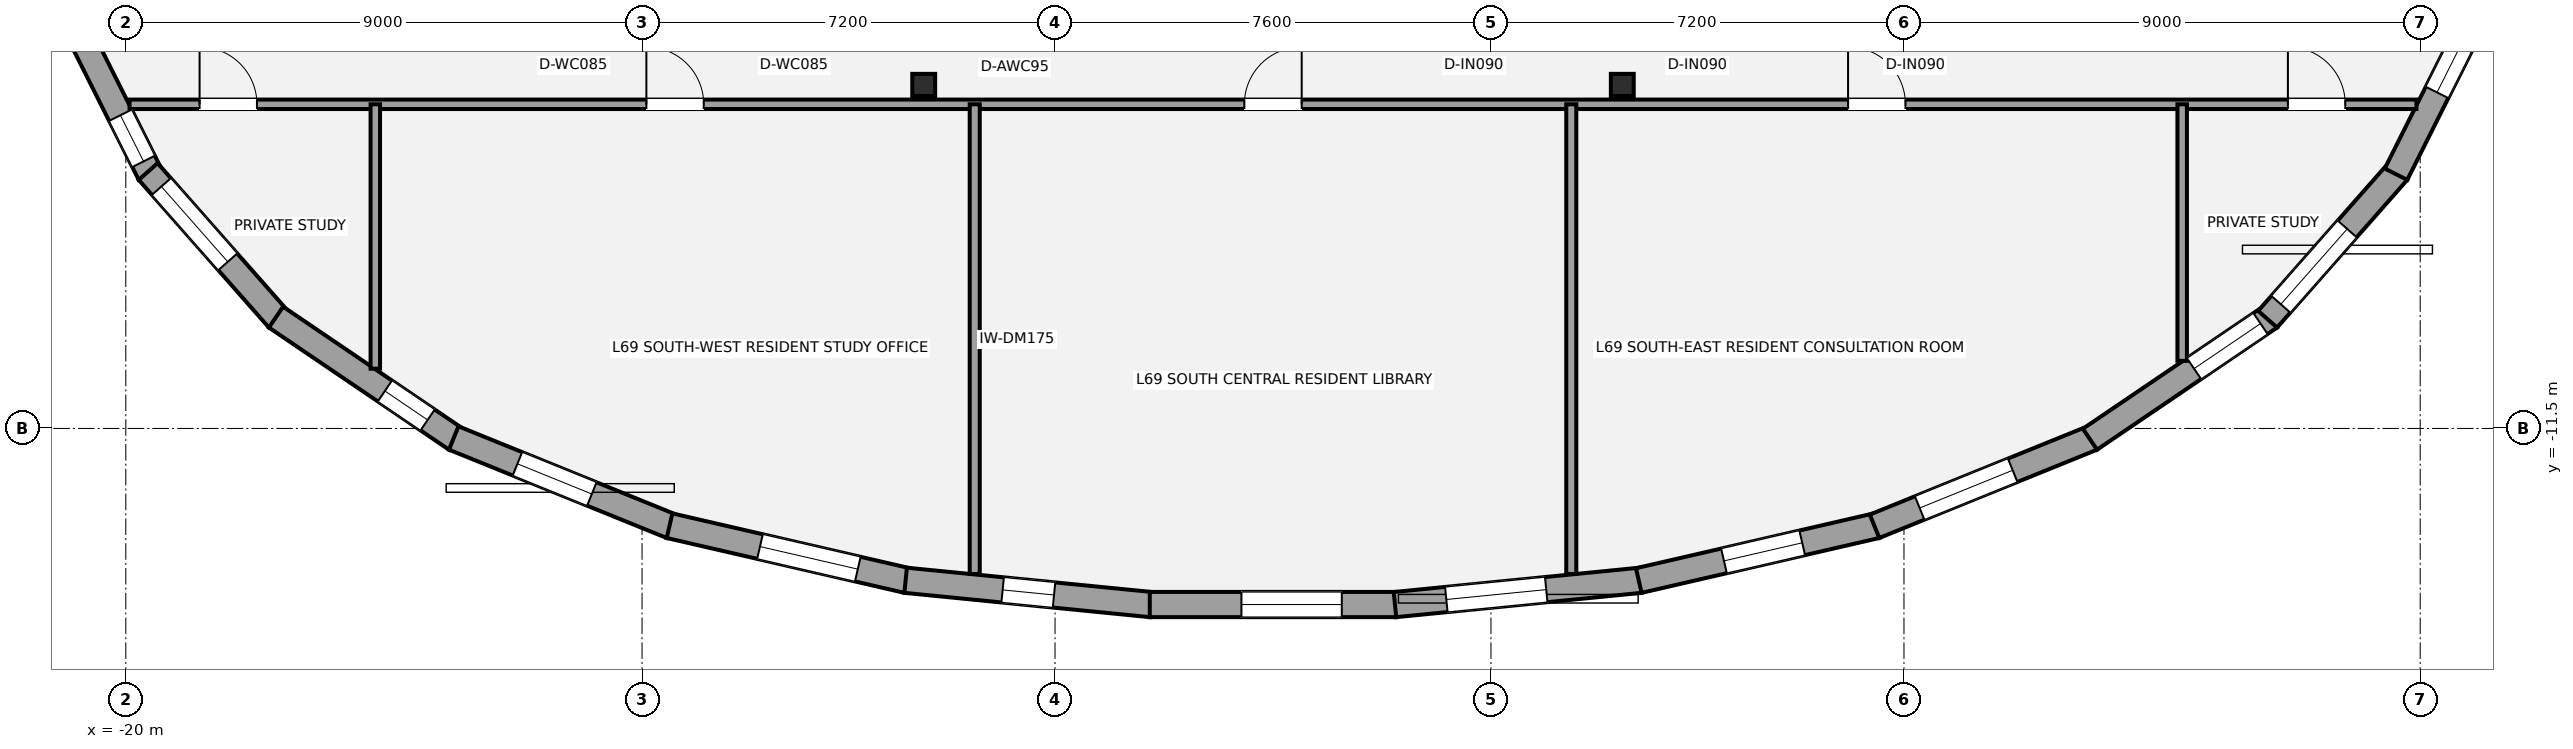
"""IFC4 building model, lengths in metres.
Left out: names, types, materials, properties, quantities, classifications, styles, units other than length and angle.
Written with IfcOpenShell. Run it as: python <this file> out.ifc"""

import sys

from ifc_helpers import new_model, si_unit, direction, frame, frame_2d, origin, origin_2d, place, context, subcontext, project, spatial, rectangle, i_section, extrude, element, fill, save


model = new_model("IFC4")
c1 = context("Model", 3, precision=1e-05, world=origin(), true_north=direction((0.0, 1.0)))
c2 = subcontext(c1, "Body", "Model", "MODEL_VIEW")
j1 = project(units=[si_unit("LENGTHUNIT", "METRE"), si_unit("PLANEANGLEUNIT", "RADIAN")], contexts=[c1])
p1 = place(None, origin())
s1 = spatial("IfcSite", under=j1, at=p1, CompositionType="ELEMENT")
p2 = place(p1, origin())
s2 = spatial("IfcBuilding", under=s1, at=p2, CompositionType="ELEMENT")
p3 = place(p2, frame((0.0, 0.0, 244.65)))
s3 = spatial("IfcBuildingStorey", under=s2, at=p3, CompositionType="ELEMENT", Elevation=244.65)
for number, where, z_axis, x_axis in (
    (1, (-6.09, -5.513, 0.0), (0.0, 0.0, 1.0), (1.0, 0.0, 0.0)),
    (2, (6.09, -5.513, 0.0), (0.0, 0.0, 1.0), (1.0, 0.0, 0.0)),
):
    element("IfcColumn", number, at=place(p3, frame(where, z_axis=z_axis, x_axis=x_axis)), inside=s3, PredefinedType="COLUMN", context=c2, shape_type="SweptSolid", body=[
        extrude(i_section(OverallWidth=0.399, OverallDepth=0.387, WebThickness=0.021, FlangeThickness=0.033, at=origin_2d()), origin(), (0.0, 0.0, 1.0), 3.15),
    ])
p4 = place(p3, frame((-19.578, -7.069, 0.0), z_axis=(0.0, 0.0, 1.0), x_axis=(-0.448424724145, 0.893820601002, 0.0)))
e3 = element("IfcWall", 3, at=p4, inside=s3, PredefinedType="STANDARD", context=c2, shape_type="SweptSolid", body=[
    extrude(rectangle(XDim=3.144, YDim=0.44, at=frame_2d((1.572, 0.0))), origin(), (0.0, 0.0, 1.0), 2.336),
])
p5 = place(p4, frame((0.25, 0.0, 0.58)))
e4 = element("IfcOpeningElement", 4, at=p5, cuts=e3, PredefinedType="OPENING", context=c2, shape_type="SweptSolid", body=[
    extrude(rectangle(XDim=0.9, YDim=1.35, at=frame_2d((0.45, 0.675))), frame((0.0, 0.23, 0.0), z_axis=(0.0, -1.0, 0.0), x_axis=(1.0, 0.0, 0.0)), (0.0, 0.0, 1.0), 0.46),
])
p6 = place(p3, frame((-17.34, -9.596, 0.0), z_axis=(0.0, 0.0, 1.0), x_axis=(-0.66136043846, 0.750068243855, 0.0)))
e5 = element("IfcWall", 5, at=p6, inside=s3, PredefinedType="STANDARD", context=c2, shape_type="SweptSolid", body=[
    extrude(rectangle(XDim=3.432, YDim=0.44, at=frame_2d((1.716, 0.0))), origin(), (0.0, 0.0, 1.0), 2.336),
])
p7 = place(p6, frame((1.334, 0.0, 0.55)))
e6 = element("IfcOpeningElement", 6, at=p7, cuts=e5, PredefinedType="OPENING", context=c2, shape_type="SweptSolid", body=[
    extrude(rectangle(XDim=1.75, YDim=1.55, at=frame_2d((0.875, 0.775))), frame((0.0, 0.23, 0.0), z_axis=(0.0, -1.0, 0.0), x_axis=(1.0, 0.0, 0.0)), (0.0, 0.0, 1.0), 0.46),
])
p8 = place(p3, frame((-14.242, -11.688, 0.0), z_axis=(0.0, 0.0, 1.0), x_axis=(-0.827637036896, 0.561263694851, 0.0)))
e7 = element("IfcWall", 7, at=p8, inside=s3, PredefinedType="STANDARD", context=c2, shape_type="SweptSolid", body=[
    extrude(rectangle(XDim=3.793, YDim=0.44, at=frame_2d((1.896, 0.0))), origin(), (0.0, 0.0, 1.0), 2.336),
])
p9 = place(p8, frame((0.599, 0.0, 0.58)))
e8 = element("IfcOpeningElement", 8, at=p9, cuts=e7, PredefinedType="OPENING", context=c2, shape_type="SweptSolid", body=[
    extrude(rectangle(XDim=0.9, YDim=1.35, at=frame_2d((0.45, 0.675))), frame((0.0, 0.23, 0.0), z_axis=(0.0, -1.0, 0.0), x_axis=(1.0, 0.0, 0.0)), (0.0, 0.0, 1.0), 0.46),
])
p10 = place(p3, frame((-10.487, -13.205, 0.0), z_axis=(0.0, 0.0, 1.0), x_axis=(-0.926731976866, 0.375723093586, 0.0)))
e9 = element("IfcWall", 9, at=p10, inside=s3, PredefinedType="STANDARD", context=c2, shape_type="SweptSolid", body=[
    extrude(rectangle(XDim=4.096, YDim=0.44, at=frame_2d((2.048, 0.0))), origin(), (0.0, 0.0, 1.0), 2.336),
])
p11 = place(p10, frame((1.498, 0.0, 0.55)))
e10 = element("IfcOpeningElement", 10, at=p11, cuts=e9, PredefinedType="OPENING", context=c2, shape_type="SweptSolid", body=[
    extrude(rectangle(XDim=1.4, YDim=1.55, at=frame_2d((0.7, 0.775))), frame((0.0, 0.23, 0.0), z_axis=(0.0, -1.0, 0.0), x_axis=(1.0, 0.0, 0.0)), (0.0, 0.0, 1.0), 0.46),
])
p12 = place(p3, frame((-6.377, -14.151, 0.0), z_axis=(0.0, 0.0, 1.0), x_axis=(-0.974398936081, 0.224825962391, 0.0)))
e11 = element("IfcWall", 11, at=p12, inside=s3, PredefinedType="STANDARD", context=c2, shape_type="SweptSolid", body=[
    extrude(rectangle(XDim=4.252, YDim=0.44, at=frame_2d((2.126, 0.0))), origin(), (0.0, 0.0, 1.0), 2.336),
])
p13 = place(p12, frame((0.885, 0.0, 0.55)))
e12 = element("IfcOpeningElement", 12, at=p13, cuts=e11, PredefinedType="OPENING", context=c2, shape_type="SweptSolid", body=[
    extrude(rectangle(XDim=1.75, YDim=1.55, at=frame_2d((0.875, 0.775))), frame((0.0, 0.23, 0.0), z_axis=(0.0, -1.0, 0.0), x_axis=(1.0, 0.0, 0.0)), (0.0, 0.0, 1.0), 0.46),
])
p14 = place(p3, frame((-2.126, -14.57, 0.0), z_axis=(0.0, 0.0, 1.0), x_axis=(-0.995134540264, 0.098525361068, 0.0)))
e13 = element("IfcWall", 13, at=p14, inside=s3, PredefinedType="STANDARD", context=c2, shape_type="SweptSolid", body=[
    extrude(rectangle(XDim=4.299, YDim=0.44, at=frame_2d((2.15, 0.0))), origin(), (0.0, 0.0, 1.0), 2.336),
])
p15 = place(p14, frame((1.7, 0.0, 0.58)))
e14 = element("IfcOpeningElement", 14, at=p15, cuts=e13, PredefinedType="OPENING", context=c2, shape_type="SweptSolid", body=[
    extrude(rectangle(XDim=0.9, YDim=1.35, at=frame_2d((0.45, 0.675))), frame((0.0, 0.23, 0.0), z_axis=(0.0, -1.0, 0.0), x_axis=(1.0, 0.0, 0.0)), (0.0, 0.0, 1.0), 0.46),
])
p16 = place(p3, frame((2.148, -14.569, 0.0), z_axis=(0.0, 0.0, 1.0), x_axis=(-1.0, 0.0, 0.0)))
e15 = element("IfcWall", 15, at=p16, inside=s3, PredefinedType="STANDARD", context=c2, shape_type="SweptSolid", body=[
    extrude(rectangle(XDim=4.296, YDim=0.44, at=frame_2d((2.148, 0.0))), origin(), (0.0, 0.0, 1.0), 2.336),
])
p17 = place(p16, frame((0.948, 0.0, 0.55)))
e16 = element("IfcOpeningElement", 16, at=p17, cuts=e15, PredefinedType="OPENING", context=c2, shape_type="SweptSolid", body=[
    extrude(rectangle(XDim=1.75, YDim=1.55, at=frame_2d((0.875, 0.775))), frame((0.0, 0.23, 0.0), z_axis=(0.0, -1.0, 0.0), x_axis=(1.0, 0.0, 0.0)), (0.0, 0.0, 1.0), 0.46),
])
p18 = place(p3, frame((6.405, -14.146, 0.0), z_axis=(0.0, 0.0, 1.0), x_axis=(-0.995134540264, -0.098525361068, 0.0)))
e17 = element("IfcWall", 17, at=p18, inside=s3, PredefinedType="STANDARD", context=c2, shape_type="SweptSolid", body=[
    extrude(rectangle(XDim=4.299, YDim=0.44, at=frame_2d((2.15, 0.0))), origin(), (0.0, 0.0, 1.0), 2.336),
])
p19 = place(p18, frame((1.649, 0.0, 0.55)))
e18 = element("IfcOpeningElement", 18, at=p19, cuts=e17, PredefinedType="OPENING", context=c2, shape_type="SweptSolid", body=[
    extrude(rectangle(XDim=1.75, YDim=1.55, at=frame_2d((0.875, 0.775))), frame((0.0, 0.23, 0.0), z_axis=(0.0, -1.0, 0.0), x_axis=(1.0, 0.0, 0.0)), (0.0, 0.0, 1.0), 0.46),
])
p20 = place(p3, frame((10.52, -13.195, 0.0), z_axis=(0.0, 0.0, 1.0), x_axis=(-0.974398936081, -0.224825962391, 0.0)))
e19 = element("IfcWall", 19, at=p20, inside=s3, PredefinedType="STANDARD", context=c2, shape_type="SweptSolid", body=[
    extrude(rectangle(XDim=4.252, YDim=0.44, at=frame_2d((2.126, 0.0))), origin(), (0.0, 0.0, 1.0), 2.336),
])
p21 = place(p20, frame((1.328, 0.0, 0.55)))
e20 = element("IfcOpeningElement", 20, at=p21, cuts=e19, PredefinedType="OPENING", context=c2, shape_type="SweptSolid", body=[
    extrude(rectangle(XDim=1.4, YDim=1.55, at=frame_2d((0.7, 0.775))), frame((0.0, 0.23, 0.0), z_axis=(0.0, -1.0, 0.0), x_axis=(1.0, 0.0, 0.0)), (0.0, 0.0, 1.0), 0.46),
])
p22 = place(p3, frame((14.283, -11.666, 0.0), z_axis=(0.0, 0.0, 1.0), x_axis=(-0.926731976866, -0.375723093586, 0.0)))
e21 = element("IfcWall", 21, at=p22, inside=s3, PredefinedType="STANDARD", context=c2, shape_type="SweptSolid", body=[
    extrude(rectangle(XDim=4.096, YDim=0.44, at=frame_2d((2.048, 0.0))), origin(), (0.0, 0.0, 1.0), 2.336),
])
p23 = place(p22, frame((1.498, 0.0, 0.55)))
e22 = element("IfcOpeningElement", 22, at=p23, cuts=e21, PredefinedType="OPENING", context=c2, shape_type="SweptSolid", body=[
    extrude(rectangle(XDim=1.75, YDim=1.55, at=frame_2d((0.875, 0.775))), frame((0.0, 0.23, 0.0), z_axis=(0.0, -1.0, 0.0), x_axis=(1.0, 0.0, 0.0)), (0.0, 0.0, 1.0), 0.46),
])
p24 = place(p3, frame((17.381, -9.559, 0.0), z_axis=(0.0, 0.0, 1.0), x_axis=(-0.827637036896, -0.561263694851, 0.0)))
e23 = element("IfcWall", 23, at=p24, inside=s3, PredefinedType="STANDARD", context=c2, shape_type="SweptSolid", body=[
    extrude(rectangle(XDim=3.793, YDim=0.44, at=frame_2d((1.896, 0.0))), origin(), (0.0, 0.0, 1.0), 2.336),
])
p25 = place(p24, frame((0.2, 0.0, 0.58)))
e24 = element("IfcOpeningElement", 24, at=p25, cuts=e23, PredefinedType="OPENING", context=c2, shape_type="SweptSolid", body=[
    extrude(rectangle(XDim=1.4, YDim=1.55, at=frame_2d((0.7, 0.775))), frame((0.0, 0.23, 0.0), z_axis=(0.0, -1.0, 0.0), x_axis=(1.0, 0.0, 0.0)), (0.0, 0.0, 1.0), 0.46),
])
p26 = place(p3, frame((19.61, -7.022, 0.0), z_axis=(0.0, 0.0, 1.0), x_axis=(-0.66136043846, -0.750068243855, 0.0)))
e25 = element("IfcWall", 25, at=p26, inside=s3, PredefinedType="STANDARD", context=c2, shape_type="SweptSolid", body=[
    extrude(rectangle(XDim=3.432, YDim=0.44, at=frame_2d((1.716, 0.0))), origin(), (0.0, 0.0, 1.0), 2.336),
])
p27 = place(p26, frame((1.334, 0.0, 0.55)))
e26 = element("IfcOpeningElement", 26, at=p27, cuts=e25, PredefinedType="OPENING", context=c2, shape_type="SweptSolid", body=[
    extrude(rectangle(XDim=1.75, YDim=1.55, at=frame_2d((0.875, 0.775))), frame((0.0, 0.23, 0.0), z_axis=(0.0, -1.0, 0.0), x_axis=(1.0, 0.0, 0.0)), (0.0, 0.0, 1.0), 0.46),
])
p28 = place(p3, frame((20.988, -4.259, 0.0), z_axis=(0.0, 0.0, 1.0), x_axis=(-0.448424724145, -0.893820601002, 0.0)))
e27 = element("IfcWall", 27, at=p28, inside=s3, PredefinedType="STANDARD", context=c2, shape_type="SweptSolid", body=[
    extrude(rectangle(XDim=3.144, YDim=0.44, at=frame_2d((1.572, 0.0))), origin(), (0.0, 0.0, 1.0), 2.336),
])
p29 = place(p28, frame((0.648, 0.0, 0.58)))
e28 = element("IfcOpeningElement", 28, at=p29, cuts=e27, PredefinedType="OPENING", context=c2, shape_type="SweptSolid", body=[
    extrude(rectangle(XDim=0.9, YDim=1.35, at=frame_2d((0.45, 0.675))), frame((0.0, 0.23, 0.0), z_axis=(0.0, -1.0, 0.0), x_axis=(1.0, 0.0, 0.0)), (0.0, 0.0, 1.0), 0.46),
])
p30 = place(p3, frame((-19.935, -5.85, 0.0), z_axis=(0.0, 0.0, 1.0), x_axis=(1.0, 0.0, 0.0)))
e29 = element("IfcWall", 29, at=p30, inside=s3, PredefinedType="PARTITIONING", context=c2, shape_type="SweptSolid", body=[
    extrude(rectangle(XDim=39.869, YDim=0.165, at=frame_2d((19.935, 0.0))), origin(), (0.0, 0.0, 1.0), 2.423),
])
p31 = place(p30, frame((1.221, 0.0, 0.0)))
e30 = element("IfcOpeningElement", 30, at=p31, cuts=e29, PredefinedType="OPENING", context=c2, shape_type="SweptSolid", body=[
    extrude(rectangle(XDim=1.0, YDim=2.15, at=frame_2d((0.5, 1.075))), frame((0.0, 0.093, 0.0), z_axis=(0.0, -1.0, 0.0), x_axis=(1.0, 0.0, 0.0)), (0.0, 0.0, 1.0), 0.185),
])
p32 = place(p30, frame((37.628, 0.0, 0.0)))
e31 = element("IfcOpeningElement", 31, at=p32, cuts=e29, PredefinedType="OPENING", context=c2, shape_type="SweptSolid", body=[
    extrude(rectangle(XDim=1.0, YDim=2.15, at=frame_2d((0.5, 1.075))), frame((0.0, 0.093, 0.0), z_axis=(0.0, -1.0, 0.0), x_axis=(1.0, 0.0, 0.0)), (0.0, 0.0, 1.0), 0.185),
])
p33 = place(p30, frame((9.01, 0.0, 0.0)))
e32 = element("IfcOpeningElement", 32, at=p33, cuts=e29, PredefinedType="OPENING", context=c2, shape_type="SweptSolid", body=[
    extrude(rectangle(XDim=1.0, YDim=2.15, at=frame_2d((0.5, 1.075))), frame((0.0, 0.093, 0.0), z_axis=(0.0, -1.0, 0.0), x_axis=(1.0, 0.0, 0.0)), (0.0, 0.0, 1.0), 0.185),
])
p34 = place(p30, frame((19.435, 0.0, 0.0)))
e33 = element("IfcOpeningElement", 33, at=p34, cuts=e29, PredefinedType="OPENING", context=c2, shape_type="SweptSolid", body=[
    extrude(rectangle(XDim=1.0, YDim=2.15, at=frame_2d((0.5, 1.075))), frame((0.0, 0.093, 0.0), z_axis=(0.0, -1.0, 0.0), x_axis=(1.0, 0.0, 0.0)), (0.0, 0.0, 1.0), 0.185),
])
p35 = place(p30, frame((29.96, 0.0, 0.0)))
e34 = element("IfcOpeningElement", 34, at=p35, cuts=e29, PredefinedType="OPENING", context=c2, shape_type="SweptSolid", body=[
    extrude(rectangle(XDim=1.0, YDim=2.15, at=frame_2d((0.5, 1.075))), frame((0.0, 0.093, 0.0), z_axis=(0.0, -1.0, 0.0), x_axis=(1.0, 0.0, 0.0)), (0.0, 0.0, 1.0), 0.185),
])
p36 = place(p3, frame((-15.65, -10.458, 0.0), z_axis=(0.0, 0.0, 1.0), x_axis=(0.0, 1.0, 0.0)))
e35 = element("IfcWall", 35, at=p36, inside=s3, PredefinedType="PARTITIONING", context=c2, shape_type="SweptSolid", body=[
    extrude(rectangle(XDim=4.608, YDim=0.165, at=frame_2d((2.304, 0.0))), origin(), (0.0, 0.0, 1.0), 2.423),
])
p37 = place(p3, frame((15.85, -10.322, 0.0), z_axis=(0.0, 0.0, 1.0), x_axis=(0.0, 1.0, 0.0)))
e36 = element("IfcWall", 36, at=p37, inside=s3, PredefinedType="PARTITIONING", context=c2, shape_type="SweptSolid", body=[
    extrude(rectangle(XDim=4.472, YDim=0.165, at=frame_2d((2.236, 0.0))), origin(), (0.0, 0.0, 1.0), 2.423),
])
for number, where, z_axis, x_axis in (
    (37, (-5.2, -14.036, 0.0), (0.0, 0.0, 1.0), (0.0, 1.0, 0.0)),
    (38, (5.2, -14.036, 0.0), (0.0, 0.0, 1.0), (0.0, 1.0, 0.0)),
):
    element("IfcWall", number, at=place(p3, frame(where, z_axis=z_axis, x_axis=x_axis)), inside=s3, PredefinedType="PARTITIONING", context=c2, shape_type="SweptSolid", body=[
        extrude(rectangle(XDim=8.186, YDim=0.175, at=frame_2d((4.093, 0.0))), origin(), (0.0, 0.0, 1.0), 2.423),
    ])
p38 = place(p5, origin())
e39 = element("IfcWindow", 39, at=p38, inside=s3, PartitioningType="SINGLE_PANEL", PredefinedType="WINDOW", context=c2, shape_type="SweptSolid", body=[
    extrude(rectangle(XDim=0.9, YDim=1.35, at=frame_2d((0.45, 0.675))), frame((0.0, -0.01, 0.0), z_axis=(0.0, -1.0, 0.0), x_axis=(1.0, 0.0, 0.0)), (0.0, 0.0, 1.0), 0.06),
])
fill(e4, e39)
p39 = place(p7, origin())
e40 = element("IfcWindow", 40, at=p39, inside=s3, PartitioningType="SINGLE_PANEL", PredefinedType="WINDOW", context=c2, shape_type="SweptSolid", body=[
    extrude(rectangle(XDim=1.75, YDim=1.55, at=frame_2d((0.875, 0.775))), frame((0.0, -0.01, 0.0), z_axis=(0.0, -1.0, 0.0), x_axis=(1.0, 0.0, 0.0)), (0.0, 0.0, 1.0), 0.06),
])
fill(e6, e40)
p40 = place(p9, origin())
e41 = element("IfcWindow", 41, at=p40, inside=s3, PartitioningType="SINGLE_PANEL", PredefinedType="WINDOW", context=c2, shape_type="SweptSolid", body=[
    extrude(rectangle(XDim=0.9, YDim=1.35, at=frame_2d((0.45, 0.675))), frame((0.0, -0.01, 0.0), z_axis=(0.0, -1.0, 0.0), x_axis=(1.0, 0.0, 0.0)), (0.0, 0.0, 1.0), 0.06),
])
fill(e8, e41)
p41 = place(p11, origin())
e42 = element("IfcWindow", 42, at=p41, inside=s3, PartitioningType="SINGLE_PANEL", PredefinedType="WINDOW", context=c2, shape_type="SweptSolid", body=[
    extrude(rectangle(XDim=1.4, YDim=1.55, at=frame_2d((0.7, 0.775))), frame((0.0, -0.01, 0.0), z_axis=(0.0, -1.0, 0.0), x_axis=(1.0, 0.0, 0.0)), (0.0, 0.0, 1.0), 0.06),
])
fill(e10, e42)
p42 = place(p13, origin())
e43 = element("IfcWindow", 43, at=p42, inside=s3, PartitioningType="SINGLE_PANEL", PredefinedType="WINDOW", context=c2, shape_type="SweptSolid", body=[
    extrude(rectangle(XDim=1.75, YDim=1.55, at=frame_2d((0.875, 0.775))), frame((0.0, -0.01, 0.0), z_axis=(0.0, -1.0, 0.0), x_axis=(1.0, 0.0, 0.0)), (0.0, 0.0, 1.0), 0.06),
])
fill(e12, e43)
p43 = place(p15, origin())
e44 = element("IfcWindow", 44, at=p43, inside=s3, PartitioningType="SINGLE_PANEL", PredefinedType="WINDOW", context=c2, shape_type="SweptSolid", body=[
    extrude(rectangle(XDim=0.9, YDim=1.35, at=frame_2d((0.45, 0.675))), frame((0.0, -0.01, 0.0), z_axis=(0.0, -1.0, 0.0), x_axis=(1.0, 0.0, 0.0)), (0.0, 0.0, 1.0), 0.06),
])
fill(e14, e44)
p44 = place(p17, origin())
e45 = element("IfcWindow", 45, at=p44, inside=s3, PartitioningType="SINGLE_PANEL", PredefinedType="WINDOW", context=c2, shape_type="SweptSolid", body=[
    extrude(rectangle(XDim=1.75, YDim=1.55, at=frame_2d((0.875, 0.775))), frame((0.0, -0.01, 0.0), z_axis=(0.0, -1.0, 0.0), x_axis=(1.0, 0.0, 0.0)), (0.0, 0.0, 1.0), 0.06),
])
fill(e16, e45)
p45 = place(p19, origin())
e46 = element("IfcWindow", 46, at=p45, inside=s3, PartitioningType="SINGLE_PANEL", PredefinedType="WINDOW", context=c2, shape_type="SweptSolid", body=[
    extrude(rectangle(XDim=1.75, YDim=1.55, at=frame_2d((0.875, 0.775))), frame((0.0, -0.01, 0.0), z_axis=(0.0, -1.0, 0.0), x_axis=(1.0, 0.0, 0.0)), (0.0, 0.0, 1.0), 0.06),
])
fill(e18, e46)
p46 = place(p21, origin())
e47 = element("IfcWindow", 47, at=p46, inside=s3, PartitioningType="SINGLE_PANEL", PredefinedType="WINDOW", context=c2, shape_type="SweptSolid", body=[
    extrude(rectangle(XDim=1.4, YDim=1.55, at=frame_2d((0.7, 0.775))), frame((0.0, -0.01, 0.0), z_axis=(0.0, -1.0, 0.0), x_axis=(1.0, 0.0, 0.0)), (0.0, 0.0, 1.0), 0.06),
])
fill(e20, e47)
p47 = place(p23, origin())
e48 = element("IfcWindow", 48, at=p47, inside=s3, PartitioningType="SINGLE_PANEL", PredefinedType="WINDOW", context=c2, shape_type="SweptSolid", body=[
    extrude(rectangle(XDim=1.75, YDim=1.55, at=frame_2d((0.875, 0.775))), frame((0.0, -0.01, 0.0), z_axis=(0.0, -1.0, 0.0), x_axis=(1.0, 0.0, 0.0)), (0.0, 0.0, 1.0), 0.06),
])
fill(e22, e48)
p48 = place(p25, origin())
e49 = element("IfcWindow", 49, at=p48, inside=s3, PartitioningType="SINGLE_PANEL", PredefinedType="WINDOW", context=c2, shape_type="SweptSolid", body=[
    extrude(rectangle(XDim=1.4, YDim=1.55, at=frame_2d((0.7, 0.775))), frame((0.0, -0.01, 0.0), z_axis=(0.0, -1.0, 0.0), x_axis=(1.0, 0.0, 0.0)), (0.0, 0.0, 1.0), 0.06),
])
fill(e24, e49)
p49 = place(p27, origin())
e50 = element("IfcWindow", 50, at=p49, inside=s3, PartitioningType="SINGLE_PANEL", PredefinedType="WINDOW", context=c2, shape_type="SweptSolid", body=[
    extrude(rectangle(XDim=1.75, YDim=1.55, at=frame_2d((0.875, 0.775))), frame((0.0, -0.01, 0.0), z_axis=(0.0, -1.0, 0.0), x_axis=(1.0, 0.0, 0.0)), (0.0, 0.0, 1.0), 0.06),
])
fill(e26, e50)
p50 = place(p29, origin())
e51 = element("IfcWindow", 51, at=p50, inside=s3, PartitioningType="SINGLE_PANEL", PredefinedType="WINDOW", context=c2, shape_type="SweptSolid", body=[
    extrude(rectangle(XDim=0.9, YDim=1.35, at=frame_2d((0.45, 0.675))), frame((0.0, -0.01, 0.0), z_axis=(0.0, -1.0, 0.0), x_axis=(1.0, 0.0, 0.0)), (0.0, 0.0, 1.0), 0.06),
])
fill(e28, e51)
p51 = place(p31, origin())
e52 = element("IfcDoor", 52, at=p51, inside=s3, OperationType="SINGLE_SWING_LEFT", PredefinedType="DOOR", context=c2, shape_type="SweptSolid", body=[
    extrude(rectangle(XDim=1.0, YDim=2.15, at=frame_2d((0.5, 1.075))), frame((0.0, 0.025, 0.0), z_axis=(0.0, -1.0, 0.0), x_axis=(1.0, 0.0, 0.0)), (0.0, 0.0, 1.0), 0.05),
])
fill(e30, e52)
p52 = place(p32, origin())
e53 = element("IfcDoor", 53, at=p52, inside=s3, OperationType="SINGLE_SWING_LEFT", PredefinedType="DOOR", context=c2, shape_type="SweptSolid", body=[
    extrude(rectangle(XDim=1.0, YDim=2.15, at=frame_2d((0.5, 1.075))), frame((0.0, 0.025, 0.0), z_axis=(0.0, -1.0, 0.0), x_axis=(1.0, 0.0, 0.0)), (0.0, 0.0, 1.0), 0.05),
])
fill(e31, e53)
p53 = place(p33, origin())
e54 = element("IfcDoor", 54, at=p53, inside=s3, OperationType="SINGLE_SWING_LEFT", PredefinedType="DOOR", context=c2, shape_type="SweptSolid", body=[
    extrude(rectangle(XDim=1.0, YDim=2.15, at=frame_2d((0.5, 1.075))), frame((0.0, 0.025, 0.0), z_axis=(0.0, -1.0, 0.0), x_axis=(1.0, 0.0, 0.0)), (0.0, 0.0, 1.0), 0.05),
])
fill(e32, e54)
p54 = place(p34, origin())
e55 = element("IfcDoor", 55, at=p54, inside=s3, OperationType="SINGLE_SWING_RIGHT", PredefinedType="DOOR", context=c2, shape_type="SweptSolid", body=[
    extrude(rectangle(XDim=1.0, YDim=2.15, at=frame_2d((0.5, 1.075))), frame((0.0, 0.025, 0.0), z_axis=(0.0, -1.0, 0.0), x_axis=(1.0, 0.0, 0.0)), (0.0, 0.0, 1.0), 0.05),
])
fill(e33, e55)
p55 = place(p35, origin())
e56 = element("IfcDoor", 56, at=p55, inside=s3, OperationType="SINGLE_SWING_LEFT", PredefinedType="DOOR", context=c2, shape_type="SweptSolid", body=[
    extrude(rectangle(XDim=1.0, YDim=2.15, at=frame_2d((0.5, 1.075))), frame((0.0, 0.025, 0.0), z_axis=(0.0, -1.0, 0.0), x_axis=(1.0, 0.0, 0.0)), (0.0, 0.0, 1.0), 0.05),
])
fill(e34, e56)
save(model, sys.argv[1])
